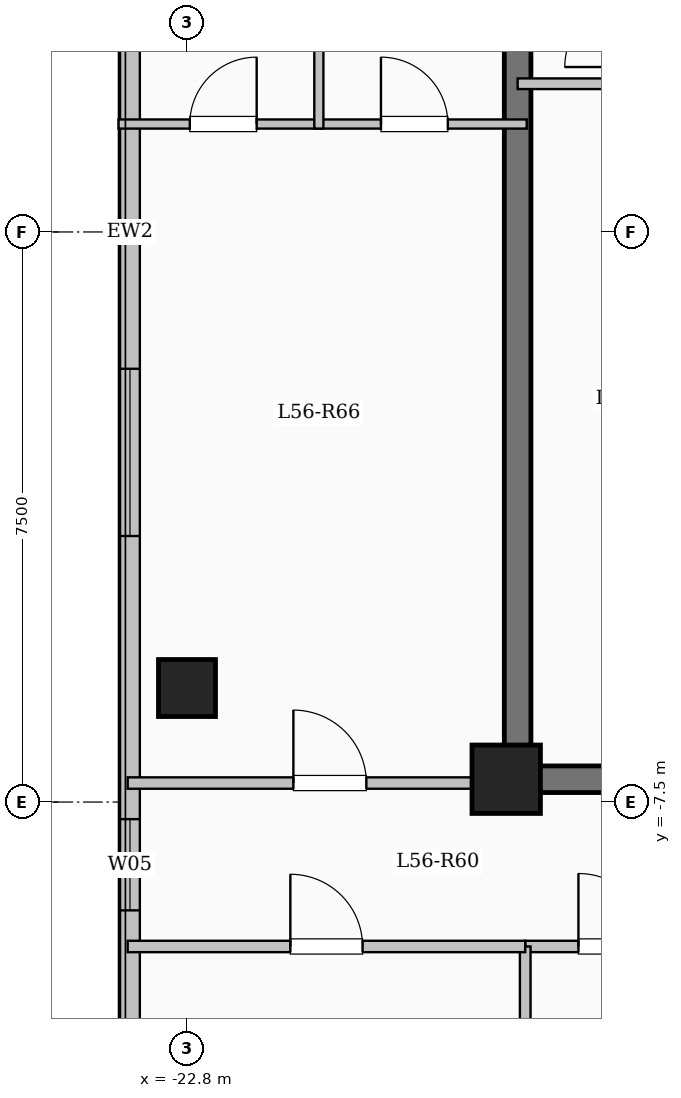
"""IFC4 building model, lengths in metres.
Left out: names, types, materials, properties, quantities, classifications, styles, units other than length and angle.
Written with IfcOpenShell. Run it as: python <this file> out.ifc"""

import sys

from ifc_helpers import new_model, si_unit, direction, frame, frame_2d, origin, origin_2d, place, context, subcontext, project, spatial, rectangle, extrude, element, fill, save


model = new_model("IFC4")
c1 = context("Model", 3, precision=1e-05, world=origin(), true_north=direction((0.0, 1.0)))
c2 = subcontext(c1, "Body", "Model", "MODEL_VIEW")
j1 = project(units=[si_unit("LENGTHUNIT", "METRE"), si_unit("PLANEANGLEUNIT", "RADIAN")], contexts=[c1])
p1 = place(None, origin())
s1 = spatial("IfcSite", under=j1, at=p1, CompositionType="ELEMENT")
p2 = place(p1, origin())
s2 = spatial("IfcBuilding", under=s1, at=p2, CompositionType="ELEMENT")
p3 = place(p2, frame((0.0, 0.0, 207.0)))
s3 = spatial("IfcBuildingStorey", under=s2, at=p3, CompositionType="ELEMENT", Elevation=207.0)
p4 = place(p3, frame((-18.6, -7.2, 0.0), z_axis=(0.0, 0.0, 1.0), x_axis=(1.0, 0.0, 0.0)))
e1 = element("IfcColumn", 1, at=p4, inside=s3, PredefinedType="COLUMN", context=c2, shape_type="SweptSolid", body=[
    extrude(rectangle(XDim=0.9, YDim=0.9, at=origin_2d()), origin(), (0.0, 0.0, 1.0), 3.35),
])
p5 = place(p3, frame((-22.8, -6.0, 0.0), z_axis=(0.0, 0.0, 1.0), x_axis=(1.0, 0.0, 0.0)))
e2 = element("IfcColumn", 2, at=p5, inside=s3, PredefinedType="COLUMN", context=c2, shape_type="SweptSolid", body=[
    extrude(rectangle(XDim=0.75, YDim=0.75, at=origin_2d()), origin(), (0.0, 0.0, 1.0), 3.35),
])
p6 = place(p3, frame((-23.55, -17.25, 0.0), z_axis=(0.0, 0.0, 1.0), x_axis=(0.0, 1.0, 0.0)))
e3 = element("IfcWall", 3, at=p6, inside=s3, PredefinedType="SOLIDWALL", context=c2, shape_type="SweptSolid", body=[
    extrude(rectangle(XDim=34.5, YDim=0.26, at=frame_2d((17.25, 0.0))), origin(), (0.0, 0.0, 1.0), 3.1),
])
p7 = place(p6, frame((2.825, 0.0, 0.9)))
e4 = element("IfcOpeningElement", 4, at=p7, cuts=e3, PredefinedType="OPENING", context=c2, shape_type="SweptSolid", body=[
    extrude(rectangle(XDim=2.2, YDim=1.75, at=frame_2d((1.1, 0.875))), frame((0.0, 0.14, 0.0), z_axis=(0.0, -1.0, 0.0), x_axis=(1.0, 0.0, 0.0)), (0.0, 0.0, 1.0), 0.28),
])
p8 = place(p6, frame((8.325, 0.0, 0.95)))
e5 = element("IfcOpeningElement", 5, at=p8, cuts=e3, PredefinedType="OPENING", context=c2, shape_type="SweptSolid", body=[
    extrude(rectangle(XDim=1.2, YDim=1.5, at=frame_2d((0.6, 0.75))), frame((0.0, 0.14, 0.0), z_axis=(0.0, -1.0, 0.0), x_axis=(1.0, 0.0, 0.0)), (0.0, 0.0, 1.0), 0.28),
])
p9 = place(p6, frame((13.25, 0.0, 0.9)))
e6 = element("IfcOpeningElement", 6, at=p9, cuts=e3, PredefinedType="OPENING", context=c2, shape_type="SweptSolid", body=[
    extrude(rectangle(XDim=2.2, YDim=1.75, at=frame_2d((1.1, 0.875))), frame((0.0, 0.14, 0.0), z_axis=(0.0, -1.0, 0.0), x_axis=(1.0, 0.0, 0.0)), (0.0, 0.0, 1.0), 0.28),
])
p10 = place(p6, frame((19.65, 0.0, 0.9)))
e7 = element("IfcOpeningElement", 7, at=p10, cuts=e3, PredefinedType="OPENING", context=c2, shape_type="SweptSolid", body=[
    extrude(rectangle(XDim=1.65, YDim=1.6, at=frame_2d((0.825, 0.8))), frame((0.0, 0.14, 0.0), z_axis=(0.0, -1.0, 0.0), x_axis=(1.0, 0.0, 0.0)), (0.0, 0.0, 1.0), 0.28),
])
p11 = place(p6, frame((24.125, 0.0, 0.9)))
e8 = element("IfcOpeningElement", 8, at=p11, cuts=e3, PredefinedType="OPENING", context=c2, shape_type="SweptSolid", body=[
    extrude(rectangle(XDim=2.0, YDim=1.7, at=frame_2d((1.0, 0.85))), frame((0.0, 0.14, 0.0), z_axis=(0.0, -1.0, 0.0), x_axis=(1.0, 0.0, 0.0)), (0.0, 0.0, 1.0), 0.28),
])
p12 = place(p6, frame((28.375, 0.0, 0.95)))
e9 = element("IfcOpeningElement", 9, at=p12, cuts=e3, PredefinedType="OPENING", context=c2, shape_type="SweptSolid", body=[
    extrude(rectangle(XDim=1.0, YDim=1.5, at=frame_2d((0.5, 0.75))), frame((0.0, 0.14, 0.0), z_axis=(0.0, -1.0, 0.0), x_axis=(1.0, 0.0, 0.0)), (0.0, 0.0, 1.0), 0.28),
])
p13 = place(p6, frame((31.125, 0.0, 0.9)))
e10 = element("IfcOpeningElement", 10, at=p13, cuts=e3, PredefinedType="OPENING", context=c2, shape_type="SweptSolid", body=[
    extrude(rectangle(XDim=2.0, YDim=1.7, at=frame_2d((1.0, 0.85))), frame((0.0, 0.14, 0.0), z_axis=(0.0, -1.0, 0.0), x_axis=(1.0, 0.0, 0.0)), (0.0, 0.0, 1.0), 0.28),
])
p14 = place(p3, frame((-18.45, -7.375, 0.0), z_axis=(0.0, 0.0, 1.0), x_axis=(0.0, 1.0, 0.0)))
e11 = element("IfcWall", 11, at=p14, inside=s3, PredefinedType="SHEAR", context=c2, shape_type="SweptSolid", body=[
    extrude(rectangle(XDim=14.05, YDim=0.35, at=frame_2d((7.025, 0.0))), origin(), (0.0, 0.0, 1.0), 3.35),
])
p15 = place(p3, frame((-18.625, -7.2, 0.0), z_axis=(0.0, 0.0, 1.0), x_axis=(1.0, 0.0, 0.0)))
e12 = element("IfcWall", 12, at=p15, inside=s3, PredefinedType="SHEAR", context=c2, shape_type="SweptSolid", body=[
    extrude(rectangle(XDim=6.0, YDim=0.35, at=frame_2d((3.0, 0.0))), origin(), (0.0, 0.0, 1.0), 3.35),
])
p16 = place(p15, frame((1.725, 0.0, 0.0)))
e13 = element("IfcOpeningElement", 13, at=p16, cuts=e12, PredefinedType="OPENING", context=c2, shape_type="SweptSolid", body=[
    extrude(rectangle(XDim=1.12, YDim=2.15, at=frame_2d((0.56, 1.075))), frame((0.0, 0.185, 0.0), z_axis=(0.0, -1.0, 0.0), x_axis=(1.0, 0.0, 0.0)), (0.0, 0.0, 1.0), 0.37),
])
p17 = place(p3, frame((-18.45, 1.95, 0.0), z_axis=(0.0, 0.0, 1.0), x_axis=(1.0, 0.0, 0.0)))
e14 = element("IfcWall", 14, at=p17, inside=s3, PredefinedType="PARTITIONING", context=c2, shape_type="SweptSolid", body=[
    extrude(rectangle(XDim=3.15, YDim=0.14, at=frame_2d((1.575, 0.0))), origin(), (0.0, 0.0, 1.0), 3.1),
])
p18 = place(p17, frame((1.9, 0.0, 0.0)))
e15 = element("IfcOpeningElement", 15, at=p18, cuts=e14, PredefinedType="OPENING", context=c2, shape_type="SweptSolid", body=[
    extrude(rectangle(XDim=0.88, YDim=2.1, at=frame_2d((0.44, 1.05))), frame((0.0, 0.08, 0.0), z_axis=(0.0, -1.0, 0.0), x_axis=(1.0, 0.0, 0.0)), (0.0, 0.0, 1.0), 0.16),
])
p19 = place(p3, frame((-18.35, -9.4, 0.0), z_axis=(0.0, 0.0, 1.0), x_axis=(1.0, 0.0, 0.0)))
e16 = element("IfcWall", 16, at=p19, inside=s3, PredefinedType="PARTITIONING", context=c2, shape_type="SweptSolid", body=[
    extrude(rectangle(XDim=9.8, YDim=0.15, at=frame_2d((4.9, 0.0))), origin(), (0.0, 0.0, 1.0), 3.1),
])
p20 = place(p19, frame((0.7, 0.0, 0.0)))
e17 = element("IfcOpeningElement", 17, at=p20, cuts=e16, PredefinedType="OPENING", context=c2, shape_type="SweptSolid", body=[
    extrude(rectangle(XDim=0.96, YDim=2.15, at=frame_2d((0.48, 1.075))), frame((0.0, 0.085, 0.0), z_axis=(0.0, -1.0, 0.0), x_axis=(1.0, 0.0, 0.0)), (0.0, 0.0, 1.0), 0.17),
])
p21 = place(p19, frame((5.38, 0.0, 0.0)))
e18 = element("IfcOpeningElement", 18, at=p21, cuts=e16, PredefinedType="OPENING", context=c2, shape_type="SweptSolid", body=[
    extrude(rectangle(XDim=0.96, YDim=2.15, at=frame_2d((0.48, 1.075))), frame((0.0, 0.085, 0.0), z_axis=(0.0, -1.0, 0.0), x_axis=(1.0, 0.0, 0.0)), (0.0, 0.0, 1.0), 0.17),
])
p22 = place(p3, frame((-23.58, -7.25, 0.0), z_axis=(0.0, 0.0, 1.0), x_axis=(1.0, 0.0, 0.0)))
e19 = element("IfcWall", 19, at=p22, inside=s3, PredefinedType="PARTITIONING", context=c2, shape_type="SweptSolid", body=[
    extrude(rectangle(XDim=5.13, YDim=0.15, at=frame_2d((2.565, 0.0))), origin(), (0.0, 0.0, 1.0), 3.1),
])
p23 = place(p22, frame((2.18, 0.0, 0.0)))
e20 = element("IfcOpeningElement", 20, at=p23, cuts=e19, PredefinedType="OPENING", context=c2, shape_type="SweptSolid", body=[
    extrude(rectangle(XDim=0.96, YDim=2.15, at=frame_2d((0.48, 1.075))), frame((0.0, 0.085, 0.0), z_axis=(0.0, -1.0, 0.0), x_axis=(1.0, 0.0, 0.0)), (0.0, 0.0, 1.0), 0.17),
])
p24 = place(p3, frame((-18.35, -17.25, 0.0), z_axis=(0.0, 0.0, 1.0), x_axis=(0.0, 1.0, 0.0)))
e21 = element("IfcWall", 21, at=p24, inside=s3, PredefinedType="PARTITIONING", context=c2, shape_type="SweptSolid", body=[
    extrude(rectangle(XDim=7.85, YDim=0.14, at=frame_2d((3.925, 0.0))), origin(), (0.0, 0.0, 1.0), 3.1),
])
p25 = place(p3, frame((-23.58, -9.4, 0.0), z_axis=(0.0, 0.0, 1.0), x_axis=(1.0, 0.0, 0.0)))
e22 = element("IfcWall", 22, at=p25, inside=s3, PredefinedType="PARTITIONING", context=c2, shape_type="SweptSolid", body=[
    extrude(rectangle(XDim=5.23, YDim=0.15, at=frame_2d((2.615, 0.0))), origin(), (0.0, 0.0, 1.0), 3.1),
])
p26 = place(p25, frame((2.14, 0.0, 0.0)))
e23 = element("IfcOpeningElement", 23, at=p26, cuts=e22, PredefinedType="OPENING", context=c2, shape_type="SweptSolid", body=[
    extrude(rectangle(XDim=0.95, YDim=2.15, at=frame_2d((0.475, 1.075))), frame((0.0, 0.085, 0.0), z_axis=(0.0, -1.0, 0.0), x_axis=(1.0, 0.0, 0.0)), (0.0, 0.0, 1.0), 0.17),
])
p27 = place(p3, frame((-23.7, 1.42, 0.0), z_axis=(0.0, 0.0, 1.0), x_axis=(1.0, 0.0, 0.0)))
e24 = element("IfcWall", 24, at=p27, inside=s3, PredefinedType="PARTITIONING", context=c2, shape_type="SweptSolid", body=[
    extrude(rectangle(XDim=5.37, YDim=0.12, at=frame_2d((2.685, 0.0))), origin(), (0.0, 0.0, 1.0), 3.1),
])
p28 = place(p27, frame((0.937, 0.0, 0.0)))
e25 = element("IfcOpeningElement", 25, at=p28, cuts=e24, PredefinedType="OPENING", context=c2, shape_type="SweptSolid", body=[
    extrude(rectangle(XDim=0.88, YDim=2.1, at=frame_2d((0.44, 1.05))), frame((0.0, 0.07, 0.0), z_axis=(0.0, -1.0, 0.0), x_axis=(1.0, 0.0, 0.0)), (0.0, 0.0, 1.0), 0.14),
])
p29 = place(p27, frame((3.452, 0.0, 0.0)))
e26 = element("IfcOpeningElement", 26, at=p29, cuts=e24, PredefinedType="OPENING", context=c2, shape_type="SweptSolid", body=[
    extrude(rectangle(XDim=0.88, YDim=2.1, at=frame_2d((0.44, 1.05))), frame((0.0, 0.07, 0.0), z_axis=(0.0, -1.0, 0.0), x_axis=(1.0, 0.0, 0.0)), (0.0, 0.0, 1.0), 0.14),
])
p30 = place(p3, frame((-21.065, 1.36, 0.0), z_axis=(0.0, 0.0, 1.0), x_axis=(0.0, 1.0, 0.0)))
e27 = element("IfcWall", 27, at=p30, inside=s3, PredefinedType="PARTITIONING", context=c2, shape_type="SweptSolid", body=[
    extrude(rectangle(XDim=3.58, YDim=0.12, at=frame_2d((1.79, 0.0))), origin(), (0.0, 0.0, 1.0), 3.1),
])
p31 = place(p8, origin())
e28 = element("IfcWindow", 28, at=p31, inside=s3, PartitioningType="SINGLE_PANEL", PredefinedType="WINDOW", context=c2, shape_type="SweptSolid", body=[
    extrude(rectangle(XDim=1.2, YDim=1.5, at=frame_2d((0.6, 0.75))), frame((0.0, 0.03, 0.0), z_axis=(0.0, -1.0, 0.0), x_axis=(1.0, 0.0, 0.0)), (0.0, 0.0, 1.0), 0.06),
])
fill(e5, e28)
p32 = place(p9, origin())
e29 = element("IfcWindow", 29, at=p32, inside=s3, PartitioningType="SINGLE_PANEL", PredefinedType="WINDOW", context=c2, shape_type="SweptSolid", body=[
    extrude(rectangle(XDim=2.2, YDim=1.75, at=frame_2d((1.1, 0.875))), frame((0.0, 0.03, 0.0), z_axis=(0.0, -1.0, 0.0), x_axis=(1.0, 0.0, 0.0)), (0.0, 0.0, 1.0), 0.06),
])
fill(e6, e29)
p33 = place(p20, origin())
e30 = element("IfcDoor", 30, at=p33, inside=s3, OperationType="SINGLE_SWING_LEFT", PredefinedType="DOOR", context=c2, shape_type="SweptSolid", body=[
    extrude(rectangle(XDim=0.96, YDim=2.15, at=frame_2d((0.48, 1.075))), frame((0.0, 0.025, 0.0), z_axis=(0.0, -1.0, 0.0), x_axis=(1.0, 0.0, 0.0)), (0.0, 0.0, 1.0), 0.05),
])
fill(e17, e30)
p34 = place(p26, origin())
e31 = element("IfcDoor", 31, at=p34, inside=s3, OperationType="SINGLE_SWING_LEFT", PredefinedType="DOOR", context=c2, shape_type="SweptSolid", body=[
    extrude(rectangle(XDim=0.95, YDim=2.15, at=frame_2d((0.475, 1.075))), frame((0.0, 0.025, 0.0), z_axis=(0.0, -1.0, 0.0), x_axis=(1.0, 0.0, 0.0)), (0.0, 0.0, 1.0), 0.05),
])
fill(e23, e31)
p35 = place(p23, origin())
e32 = element("IfcDoor", 32, at=p35, inside=s3, OperationType="SINGLE_SWING_LEFT", PredefinedType="DOOR", context=c2, shape_type="SweptSolid", body=[
    extrude(rectangle(XDim=0.96, YDim=2.15, at=frame_2d((0.48, 1.075))), frame((0.0, 0.025, 0.0), z_axis=(0.0, -1.0, 0.0), x_axis=(1.0, 0.0, 0.0)), (0.0, 0.0, 1.0), 0.05),
])
fill(e20, e32)
p36 = place(p28, origin())
e33 = element("IfcDoor", 33, at=p36, inside=s3, OperationType="SINGLE_SWING_RIGHT", PredefinedType="DOOR", context=c2, shape_type="SweptSolid", body=[
    extrude(rectangle(XDim=0.88, YDim=2.1, at=frame_2d((0.44, 1.05))), frame((0.0, 0.025, 0.0), z_axis=(0.0, -1.0, 0.0), x_axis=(1.0, 0.0, 0.0)), (0.0, 0.0, 1.0), 0.05),
])
fill(e25, e33)
p37 = place(p29, origin())
e34 = element("IfcDoor", 34, at=p37, inside=s3, OperationType="SINGLE_SWING_LEFT", PredefinedType="DOOR", context=c2, shape_type="SweptSolid", body=[
    extrude(rectangle(XDim=0.88, YDim=2.1, at=frame_2d((0.44, 1.05))), frame((0.0, 0.025, 0.0), z_axis=(0.0, -1.0, 0.0), x_axis=(1.0, 0.0, 0.0)), (0.0, 0.0, 1.0), 0.05),
])
fill(e26, e34)
save(model, sys.argv[1])
